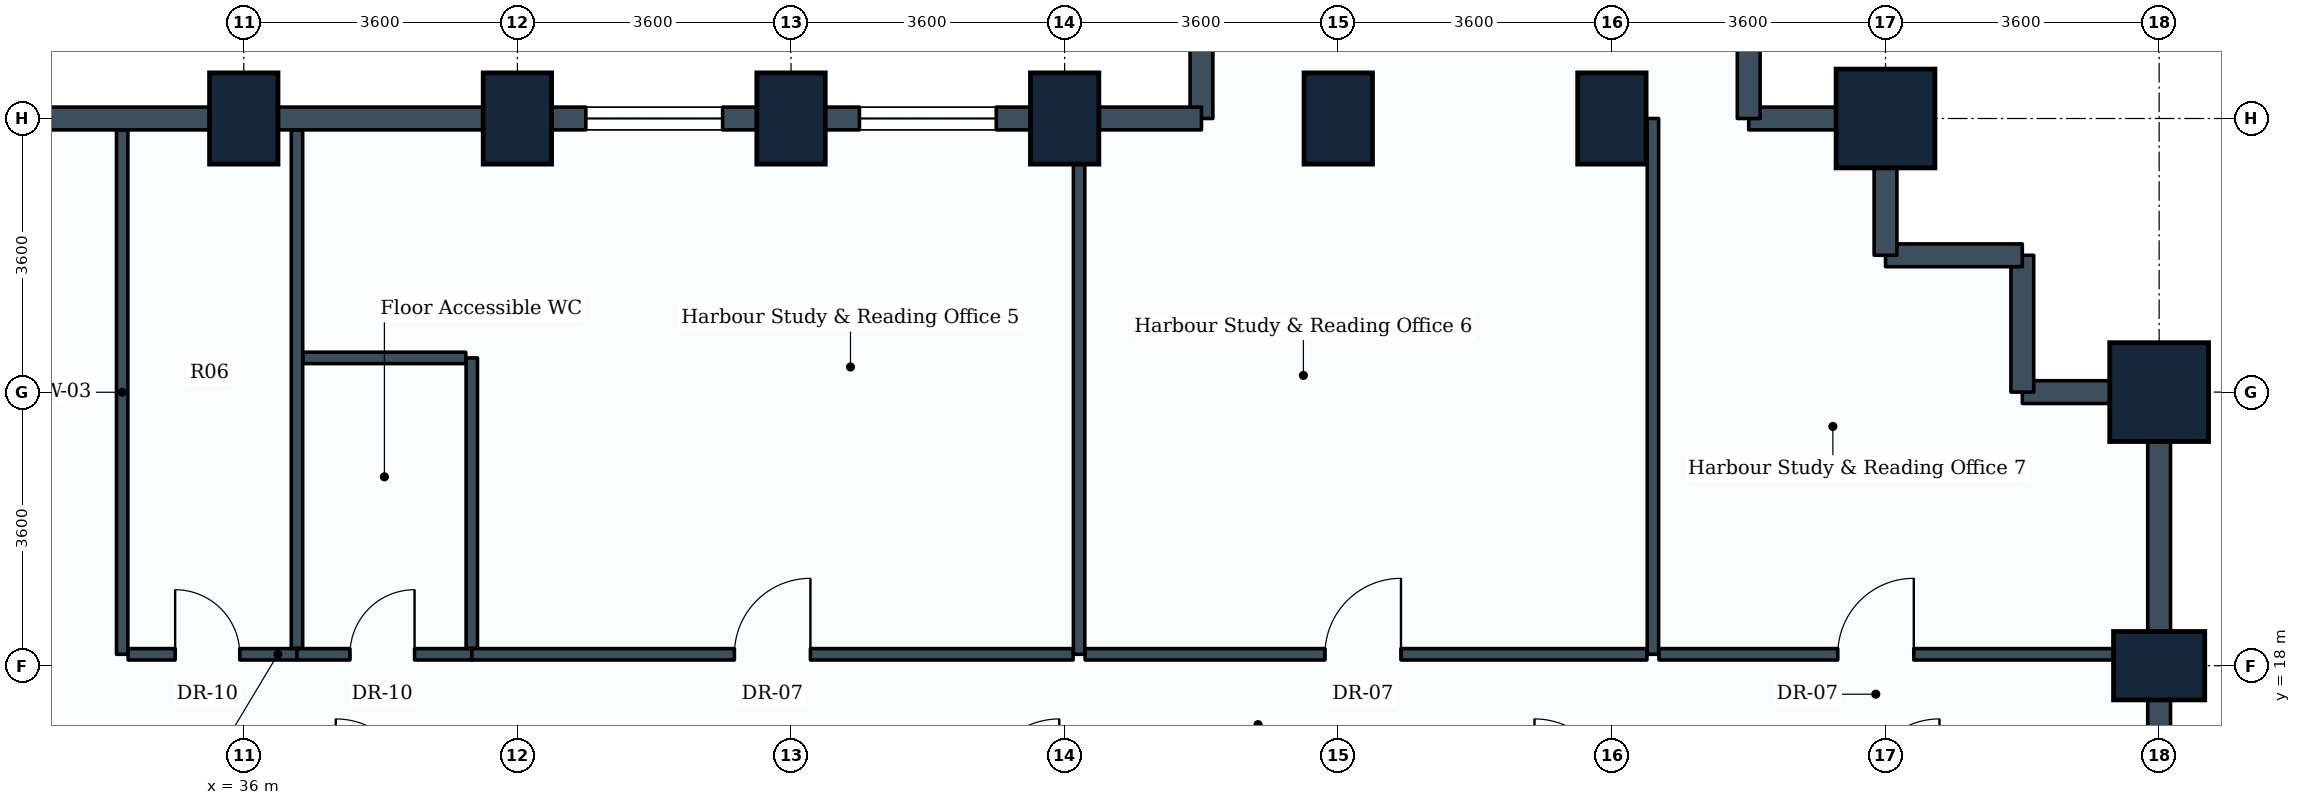
"""IFC4 building model, lengths in metres.
Left out: names, types, materials, properties, quantities, classifications, styles, units other than length and angle.
Written with IfcOpenShell. Run it as: python <this file> out.ifc"""

import sys

from ifc_helpers import new_model, si_unit, direction, frame, frame_2d, origin, origin_2d, place, context, subcontext, project, spatial, rectangle, extrude, element, fill, save


model = new_model("IFC4")
c1 = context("Model", 3, precision=1e-05, world=origin(), true_north=direction((0.0, 1.0)))
c2 = subcontext(c1, "Body", "Model", "MODEL_VIEW")
j1 = project(units=[si_unit("LENGTHUNIT", "METRE"), si_unit("PLANEANGLEUNIT", "RADIAN")], contexts=[c1])
p1 = place(None, origin())
s1 = spatial("IfcSite", under=j1, at=p1, CompositionType="ELEMENT")
p2 = place(p1, origin())
s2 = spatial("IfcBuilding", under=s1, at=p2, CompositionType="ELEMENT")
p3 = place(p2, frame((0.0, 0.0, 39.6)))
s3 = spatial("IfcBuildingStorey", under=s2, at=p3, CompositionType="ELEMENT", Elevation=39.6)
for number, where, z_axis, x_axis in (
    (1, (36.0, 25.2, 0.0), (0.0, 0.0, 1.0), (1.0, 0.0, 0.0)),
    (2, (39.6, 25.2, 0.0), (0.0, 0.0, 1.0), (1.0, 0.0, 0.0)),
    (3, (43.2, 25.2, 0.0), (0.0, 0.0, 1.0), (1.0, 0.0, 0.0)),
    (4, (46.8, 25.2, 0.0), (0.0, 0.0, 1.0), (1.0, 0.0, 0.0)),
    (5, (50.4, 25.2, 0.0), (0.0, 0.0, 1.0), (1.0, 0.0, 0.0)),
    (6, (54.0, 25.2, 0.0), (0.0, 0.0, 1.0), (1.0, 0.0, 0.0)),
):
    element("IfcColumn", number, at=place(p3, frame(where, z_axis=z_axis, x_axis=x_axis)), inside=s3, PredefinedType="COLUMN", context=c2, shape_type="SweptSolid", body=[
        extrude(rectangle(XDim=0.9, YDim=1.2, at=origin_2d()), origin(), (0.0, 0.0, 1.0), 3.9),
    ])
p4 = place(p3, frame((57.6, 25.2, 0.0), z_axis=(0.0, 0.0, 1.0), x_axis=(1.0, 0.0, 0.0)))
e7 = element("IfcColumn", 7, at=p4, inside=s3, PredefinedType="COLUMN", context=c2, shape_type="SweptSolid", body=[
    extrude(rectangle(XDim=1.3, YDim=1.3, at=origin_2d()), origin(), (0.0, 0.0, 1.0), 3.9),
])
p5 = place(p3, frame((61.2, 18.0, 0.0), z_axis=(0.0, 0.0, 1.0), x_axis=(0.0, 1.0, 0.0)))
e8 = element("IfcColumn", 8, at=p5, inside=s3, PredefinedType="COLUMN", context=c2, shape_type="SweptSolid", body=[
    extrude(rectangle(XDim=0.9, YDim=1.2, at=origin_2d()), origin(), (0.0, 0.0, 1.0), 3.9),
])
p6 = place(p3, frame((61.2, 21.6, 0.0), z_axis=(0.0, 0.0, 1.0), x_axis=(0.0, 1.0, 0.0)))
e9 = element("IfcColumn", 9, at=p6, inside=s3, PredefinedType="COLUMN", context=c2, shape_type="SweptSolid", body=[
    extrude(rectangle(XDim=1.3, YDim=1.3, at=origin_2d()), origin(), (0.0, 0.0, 1.0), 3.9),
])
for number, where, z_axis, x_axis in (
    (10, (61.2, 18.0, 0.0), (0.0, 0.0, 1.0), (0.0, -1.0, 0.0)),
    (11, (61.2, 21.6, 0.0), (0.0, 0.0, 1.0), (0.0, -1.0, 0.0)),
):
    element("IfcWall", number, at=place(p3, frame(where, z_axis=z_axis, x_axis=x_axis)), inside=s3, PredefinedType="STANDARD", context=c2, shape_type="SweptSolid", body=[
        extrude(rectangle(XDim=3.6, YDim=0.3, at=frame_2d((1.8, 0.0))), origin(), (0.0, 0.0, 1.0), 2.93),
    ])
p7 = place(p3, frame((61.2, 21.6, 0.0), z_axis=(0.0, 0.0, 1.0), x_axis=(-1.0, 0.0, 0.0)))
e12 = element("IfcWall", 12, at=p7, inside=s3, PredefinedType="STANDARD", context=c2, shape_type="SweptSolid", body=[
    extrude(rectangle(XDim=1.8, YDim=0.3, at=frame_2d((0.9, 0.0))), origin(), (0.0, 0.0, 1.0), 2.93),
])
for number, where, z_axis, x_axis in (
    (13, (59.4, 23.4, 0.0), (0.0, 0.0, 1.0), (0.0, -1.0, 0.0)),
    (14, (57.6, 23.4, 0.0), (0.0, 0.0, 1.0), (1.0, 0.0, 0.0)),
):
    element("IfcWall", number, at=place(p3, frame(where, z_axis=z_axis, x_axis=x_axis)), inside=s3, PredefinedType="STANDARD", context=c2, shape_type="SweptSolid", body=[
        extrude(rectangle(XDim=1.8, YDim=0.3, at=frame_2d((0.9, 0.0))), origin(), (0.0, 0.0, 1.0), 3.635),
    ])
for number, where, z_axis, x_axis in (
    (15, (57.6, 25.2, 0.0), (0.0, 0.0, 1.0), (0.0, -1.0, 0.0)),
    (16, (55.8, 25.2, 0.0), (0.0, 0.0, 1.0), (1.0, 0.0, 0.0)),
):
    element("IfcWall", number, at=place(p3, frame(where, z_axis=z_axis, x_axis=x_axis)), inside=s3, PredefinedType="STANDARD", context=c2, shape_type="SweptSolid", body=[
        extrude(rectangle(XDim=1.8, YDim=0.3, at=frame_2d((0.9, 0.0))), origin(), (0.0, 0.0, 1.0), 2.93),
    ])
for number, where, z_axis, x_axis in (
    (17, (55.8, 27.3, 0.0), (0.0, 0.0, 1.0), (0.0, -1.0, 0.0)),
    (18, (48.6, 27.3, 0.0), (0.0, 0.0, 1.0), (0.0, -1.0, 0.0)),
):
    element("IfcWall", number, at=place(p3, frame(where, z_axis=z_axis, x_axis=x_axis)), inside=s3, PredefinedType="STANDARD", context=c2, shape_type="SweptSolid", body=[
        extrude(rectangle(XDim=2.1, YDim=0.3, at=frame_2d((1.05, 0.0))), origin(), (0.0, 0.0, 1.0), 2.93),
    ])
p8 = place(p3, frame((46.8, 25.2, 0.0), z_axis=(0.0, 0.0, 1.0), x_axis=(1.0, 0.0, 0.0)))
e19 = element("IfcWall", 19, at=p8, inside=s3, PredefinedType="STANDARD", context=c2, shape_type="SweptSolid", body=[
    extrude(rectangle(XDim=1.8, YDim=0.3, at=frame_2d((0.9, 0.0))), origin(), (0.0, 0.0, 1.0), 2.93),
])
p9 = place(p3, frame((43.2, 25.2, 0.0), z_axis=(0.0, 0.0, 1.0), x_axis=(1.0, 0.0, 0.0)))
e20 = element("IfcWall", 20, at=p9, inside=s3, PredefinedType="STANDARD", context=c2, shape_type="SweptSolid", body=[
    extrude(rectangle(XDim=3.6, YDim=0.3, at=frame_2d((1.8, 0.0))), origin(), (0.0, 0.0, 1.0), 2.93),
])
p10 = place(p9, frame((0.9, 0.0, 0.85)))
e21 = element("IfcOpeningElement", 21, at=p10, cuts=e20, PredefinedType="OPENING", context=c2, shape_type="SweptSolid", body=[
    extrude(rectangle(XDim=1.8, YDim=1.35, at=frame_2d((0.9, 0.675))), frame((0.0, 0.16, 0.0), z_axis=(0.0, -1.0, 0.0), x_axis=(1.0, 0.0, 0.0)), (0.0, 0.0, 1.0), 0.32),
])
p11 = place(p3, frame((39.6, 25.2, 0.0), z_axis=(0.0, 0.0, 1.0), x_axis=(1.0, 0.0, 0.0)))
e22 = element("IfcWall", 22, at=p11, inside=s3, PredefinedType="STANDARD", context=c2, shape_type="SweptSolid", body=[
    extrude(rectangle(XDim=3.6, YDim=0.3, at=frame_2d((1.8, 0.0))), origin(), (0.0, 0.0, 1.0), 2.93),
])
p12 = place(p11, frame((0.9, 0.0, 0.85)))
e23 = element("IfcOpeningElement", 23, at=p12, cuts=e22, PredefinedType="OPENING", context=c2, shape_type="SweptSolid", body=[
    extrude(rectangle(XDim=1.8, YDim=1.35, at=frame_2d((0.9, 0.675))), frame((0.0, 0.16, 0.0), z_axis=(0.0, -1.0, 0.0), x_axis=(1.0, 0.0, 0.0)), (0.0, 0.0, 1.0), 0.32),
])
for number, where, z_axis, x_axis in (
    (24, (36.0, 25.2, 0.0), (0.0, 0.0, 1.0), (1.0, 0.0, 0.0)),
    (25, (32.4, 25.2, 0.0), (0.0, 0.0, 1.0), (1.0, 0.0, 0.0)),
):
    element("IfcWall", number, at=place(p3, frame(where, z_axis=z_axis, x_axis=x_axis)), inside=s3, PredefinedType="STANDARD", context=c2, shape_type="SweptSolid", body=[
        extrude(rectangle(XDim=3.6, YDim=0.3, at=frame_2d((1.8, 0.0))), origin(), (0.0, 0.0, 1.0), 2.93),
    ])
p13 = place(p3, frame((34.4, 18.15, 0.0), z_axis=(0.0, 0.0, 1.0), x_axis=(0.0, 1.0, 0.0)))
e26 = element("IfcWall", 26, at=p13, inside=s3, PredefinedType="PARTITIONING", context=c2, shape_type="SweptSolid", body=[
    extrude(rectangle(XDim=6.896, YDim=0.15, at=frame_2d((3.448, 0.0))), origin(), (0.0, 0.0, 1.0), 2.93),
])
p14 = place(p3, frame((34.479, 18.15, 0.0), z_axis=(0.0, 0.0, 1.0), x_axis=(1.0, 0.0, 0.0)))
e27 = element("IfcWall", 27, at=p14, inside=s3, PredefinedType="PARTITIONING", context=c2, shape_type="SweptSolid", body=[
    extrude(rectangle(XDim=2.221, YDim=0.15, at=frame_2d((1.11, 0.0))), origin(), (0.0, 0.0, 1.0), 3.08),
])
p15 = place(p14, frame((0.618, 0.0, 0.0)))
e28 = element("IfcOpeningElement", 28, at=p15, cuts=e27, PredefinedType="OPENING", context=c2, shape_type="SweptSolid", body=[
    extrude(rectangle(XDim=0.85, YDim=2.1, at=frame_2d((0.425, 1.05))), frame((0.0, 0.085, 0.0), z_axis=(0.0, -1.0, 0.0), x_axis=(1.0, 0.0, 0.0)), (0.0, 0.0, 1.0), 0.17),
])
p16 = place(p3, frame((36.7, 18.229, 0.0), z_axis=(0.0, 0.0, 1.0), x_axis=(0.0, 1.0, 0.0)))
e29 = element("IfcWall", 29, at=p16, inside=s3, PredefinedType="PARTITIONING", context=c2, shape_type="SweptSolid", body=[
    extrude(rectangle(XDim=6.817, YDim=0.15, at=frame_2d((3.408, 0.0))), origin(), (0.0, 0.0, 1.0), 2.93),
])
p17 = place(p3, frame((36.7, 18.15, 0.0), z_axis=(0.0, 0.0, 1.0), x_axis=(1.0, 0.0, 0.0)))
e30 = element("IfcWall", 30, at=p17, inside=s3, PredefinedType="PARTITIONING", context=c2, shape_type="SweptSolid", body=[
    extrude(rectangle(XDim=2.3, YDim=0.15, at=frame_2d((1.15, 0.0))), origin(), (0.0, 0.0, 1.0), 3.08),
])
p18 = place(p17, frame((0.697, 0.0, 0.0)))
e31 = element("IfcOpeningElement", 31, at=p18, cuts=e30, PredefinedType="OPENING", context=c2, shape_type="SweptSolid", body=[
    extrude(rectangle(XDim=0.85, YDim=2.1, at=frame_2d((0.425, 1.05))), frame((0.0, 0.085, 0.0), z_axis=(0.0, -1.0, 0.0), x_axis=(1.0, 0.0, 0.0)), (0.0, 0.0, 1.0), 0.17),
])
p19 = place(p3, frame((39.0, 18.229, 0.0), z_axis=(0.0, 0.0, 1.0), x_axis=(0.0, 1.0, 0.0)))
e32 = element("IfcWall", 32, at=p19, inside=s3, PredefinedType="PARTITIONING", context=c2, shape_type="SweptSolid", body=[
    extrude(rectangle(XDim=3.821, YDim=0.15, at=frame_2d((1.911, 0.0))), origin(), (0.0, 0.0, 1.0), 3.03),
])
p20 = place(p3, frame((36.779, 22.05, 0.0), z_axis=(0.0, 0.0, 1.0), x_axis=(1.0, 0.0, 0.0)))
e33 = element("IfcWall", 33, at=p20, inside=s3, PredefinedType="PARTITIONING", context=c2, shape_type="SweptSolid", body=[
    extrude(rectangle(XDim=2.142, YDim=0.15, at=frame_2d((1.071, 0.0))), origin(), (0.0, 0.0, 1.0), 3.635),
])
p21 = place(p3, frame((46.99, 18.15, 0.0), z_axis=(0.0, 0.0, 1.0), x_axis=(0.0, 1.0, 0.0)))
e34 = element("IfcWall", 34, at=p21, inside=s3, PredefinedType="PARTITIONING", context=c2, shape_type="SweptSolid", body=[
    extrude(rectangle(XDim=6.896, YDim=0.15, at=frame_2d((3.448, 0.0))), origin(), (0.0, 0.0, 1.0), 2.93),
])
p22 = place(p3, frame((39.0, 18.15, 0.0), z_axis=(0.0, 0.0, 1.0), x_axis=(1.0, 0.0, 0.0)))
e35 = element("IfcWall", 35, at=p22, inside=s3, PredefinedType="PARTITIONING", context=c2, shape_type="SweptSolid", body=[
    extrude(rectangle(XDim=7.911, YDim=0.15, at=frame_2d((3.956, 0.0))), origin(), (0.0, 0.0, 1.0), 3.03),
])
p23 = place(p22, frame((3.455, 0.0, 0.0)))
e36 = element("IfcOpeningElement", 36, at=p23, cuts=e35, PredefinedType="OPENING", context=c2, shape_type="SweptSolid", body=[
    extrude(rectangle(XDim=1.0, YDim=2.1, at=frame_2d((0.5, 1.05))), frame((0.0, 0.085, 0.0), z_axis=(0.0, -1.0, 0.0), x_axis=(1.0, 0.0, 0.0)), (0.0, 0.0, 1.0), 0.17),
])
p24 = place(p3, frame((54.54, 18.15, 0.0), z_axis=(0.0, 0.0, 1.0), x_axis=(0.0, 1.0, 0.0)))
e37 = element("IfcWall", 37, at=p24, inside=s3, PredefinedType="PARTITIONING", context=c2, shape_type="SweptSolid", body=[
    extrude(rectangle(XDim=7.05, YDim=0.15, at=frame_2d((3.525, 0.0))), origin(), (0.0, 0.0, 1.0), 2.93),
])
p25 = place(p3, frame((47.069, 18.15, 0.0), z_axis=(0.0, 0.0, 1.0), x_axis=(1.0, 0.0, 0.0)))
e38 = element("IfcWall", 38, at=p25, inside=s3, PredefinedType="PARTITIONING", context=c2, shape_type="SweptSolid", body=[
    extrude(rectangle(XDim=7.392, YDim=0.15, at=frame_2d((3.696, 0.0))), origin(), (0.0, 0.0, 1.0), 3.04),
])
p26 = place(p25, frame((3.156, 0.0, 0.0)))
e39 = element("IfcOpeningElement", 39, at=p26, cuts=e38, PredefinedType="OPENING", context=c2, shape_type="SweptSolid", body=[
    extrude(rectangle(XDim=1.0, YDim=2.1, at=frame_2d((0.5, 1.05))), frame((0.0, 0.085, 0.0), z_axis=(0.0, -1.0, 0.0), x_axis=(1.0, 0.0, 0.0)), (0.0, 0.0, 1.0), 0.17),
])
p27 = place(p3, frame((54.619, 18.15, 0.0), z_axis=(0.0, 0.0, 1.0), x_axis=(1.0, 0.0, 0.0)))
e40 = element("IfcWall", 40, at=p27, inside=s3, PredefinedType="PARTITIONING", context=c2, shape_type="SweptSolid", body=[
    extrude(rectangle(XDim=6.427, YDim=0.15, at=frame_2d((3.213, 0.0))), origin(), (0.0, 0.0, 1.0), 2.93),
])
p28 = place(p27, frame((2.353, 0.0, 0.0)))
e41 = element("IfcOpeningElement", 41, at=p28, cuts=e40, PredefinedType="OPENING", context=c2, shape_type="SweptSolid", body=[
    extrude(rectangle(XDim=1.0, YDim=2.1, at=frame_2d((0.5, 1.05))), frame((0.0, 0.085, 0.0), z_axis=(0.0, -1.0, 0.0), x_axis=(1.0, 0.0, 0.0)), (0.0, 0.0, 1.0), 0.17),
])
p29 = place(p10, origin())
e42 = element("IfcWindow", 42, at=p29, inside=s3, PartitioningType="SINGLE_PANEL", PredefinedType="WINDOW", context=c2, shape_type="SweptSolid", body=[
    extrude(rectangle(XDim=1.8, YDim=1.35, at=frame_2d((0.9, 0.675))), frame((0.0, 0.03, 0.0), z_axis=(0.0, -1.0, 0.0), x_axis=(1.0, 0.0, 0.0)), (0.0, 0.0, 1.0), 0.06),
])
fill(e21, e42)
p30 = place(p12, origin())
e43 = element("IfcWindow", 43, at=p30, inside=s3, PartitioningType="SINGLE_PANEL", PredefinedType="WINDOW", context=c2, shape_type="SweptSolid", body=[
    extrude(rectangle(XDim=1.8, YDim=1.35, at=frame_2d((0.9, 0.675))), frame((0.0, 0.03, 0.0), z_axis=(0.0, -1.0, 0.0), x_axis=(1.0, 0.0, 0.0)), (0.0, 0.0, 1.0), 0.06),
])
fill(e23, e43)
p31 = place(p15, origin())
e44 = element("IfcDoor", 44, at=p31, inside=s3, OperationType="SINGLE_SWING_LEFT", PredefinedType="DOOR", context=c2, shape_type="SweptSolid", body=[
    extrude(rectangle(XDim=0.85, YDim=2.1, at=frame_2d((0.425, 1.05))), frame((0.0, 0.025, 0.0), z_axis=(0.0, -1.0, 0.0), x_axis=(1.0, 0.0, 0.0)), (0.0, 0.0, 1.0), 0.05),
])
fill(e28, e44)
p32 = place(p18, origin())
e45 = element("IfcDoor", 45, at=p32, inside=s3, OperationType="SINGLE_SWING_RIGHT", PredefinedType="DOOR", context=c2, shape_type="SweptSolid", body=[
    extrude(rectangle(XDim=0.85, YDim=2.1, at=frame_2d((0.425, 1.05))), frame((0.0, 0.025, 0.0), z_axis=(0.0, -1.0, 0.0), x_axis=(1.0, 0.0, 0.0)), (0.0, 0.0, 1.0), 0.05),
])
fill(e31, e45)
p33 = place(p23, origin())
e46 = element("IfcDoor", 46, at=p33, inside=s3, OperationType="SINGLE_SWING_RIGHT", PredefinedType="DOOR", context=c2, shape_type="SweptSolid", body=[
    extrude(rectangle(XDim=1.0, YDim=2.1, at=frame_2d((0.5, 1.05))), frame((0.0, 0.025, 0.0), z_axis=(0.0, -1.0, 0.0), x_axis=(1.0, 0.0, 0.0)), (0.0, 0.0, 1.0), 0.05),
])
fill(e36, e46)
p34 = place(p26, origin())
e47 = element("IfcDoor", 47, at=p34, inside=s3, OperationType="SINGLE_SWING_RIGHT", PredefinedType="DOOR", context=c2, shape_type="SweptSolid", body=[
    extrude(rectangle(XDim=1.0, YDim=2.1, at=frame_2d((0.5, 1.05))), frame((0.0, 0.025, 0.0), z_axis=(0.0, -1.0, 0.0), x_axis=(1.0, 0.0, 0.0)), (0.0, 0.0, 1.0), 0.05),
])
fill(e39, e47)
p35 = place(p28, origin())
e48 = element("IfcDoor", 48, at=p35, inside=s3, OperationType="SINGLE_SWING_RIGHT", PredefinedType="DOOR", context=c2, shape_type="SweptSolid", body=[
    extrude(rectangle(XDim=1.0, YDim=2.1, at=frame_2d((0.5, 1.05))), frame((0.0, 0.025, 0.0), z_axis=(0.0, -1.0, 0.0), x_axis=(1.0, 0.0, 0.0)), (0.0, 0.0, 1.0), 0.05),
])
fill(e41, e48)
save(model, sys.argv[1])
